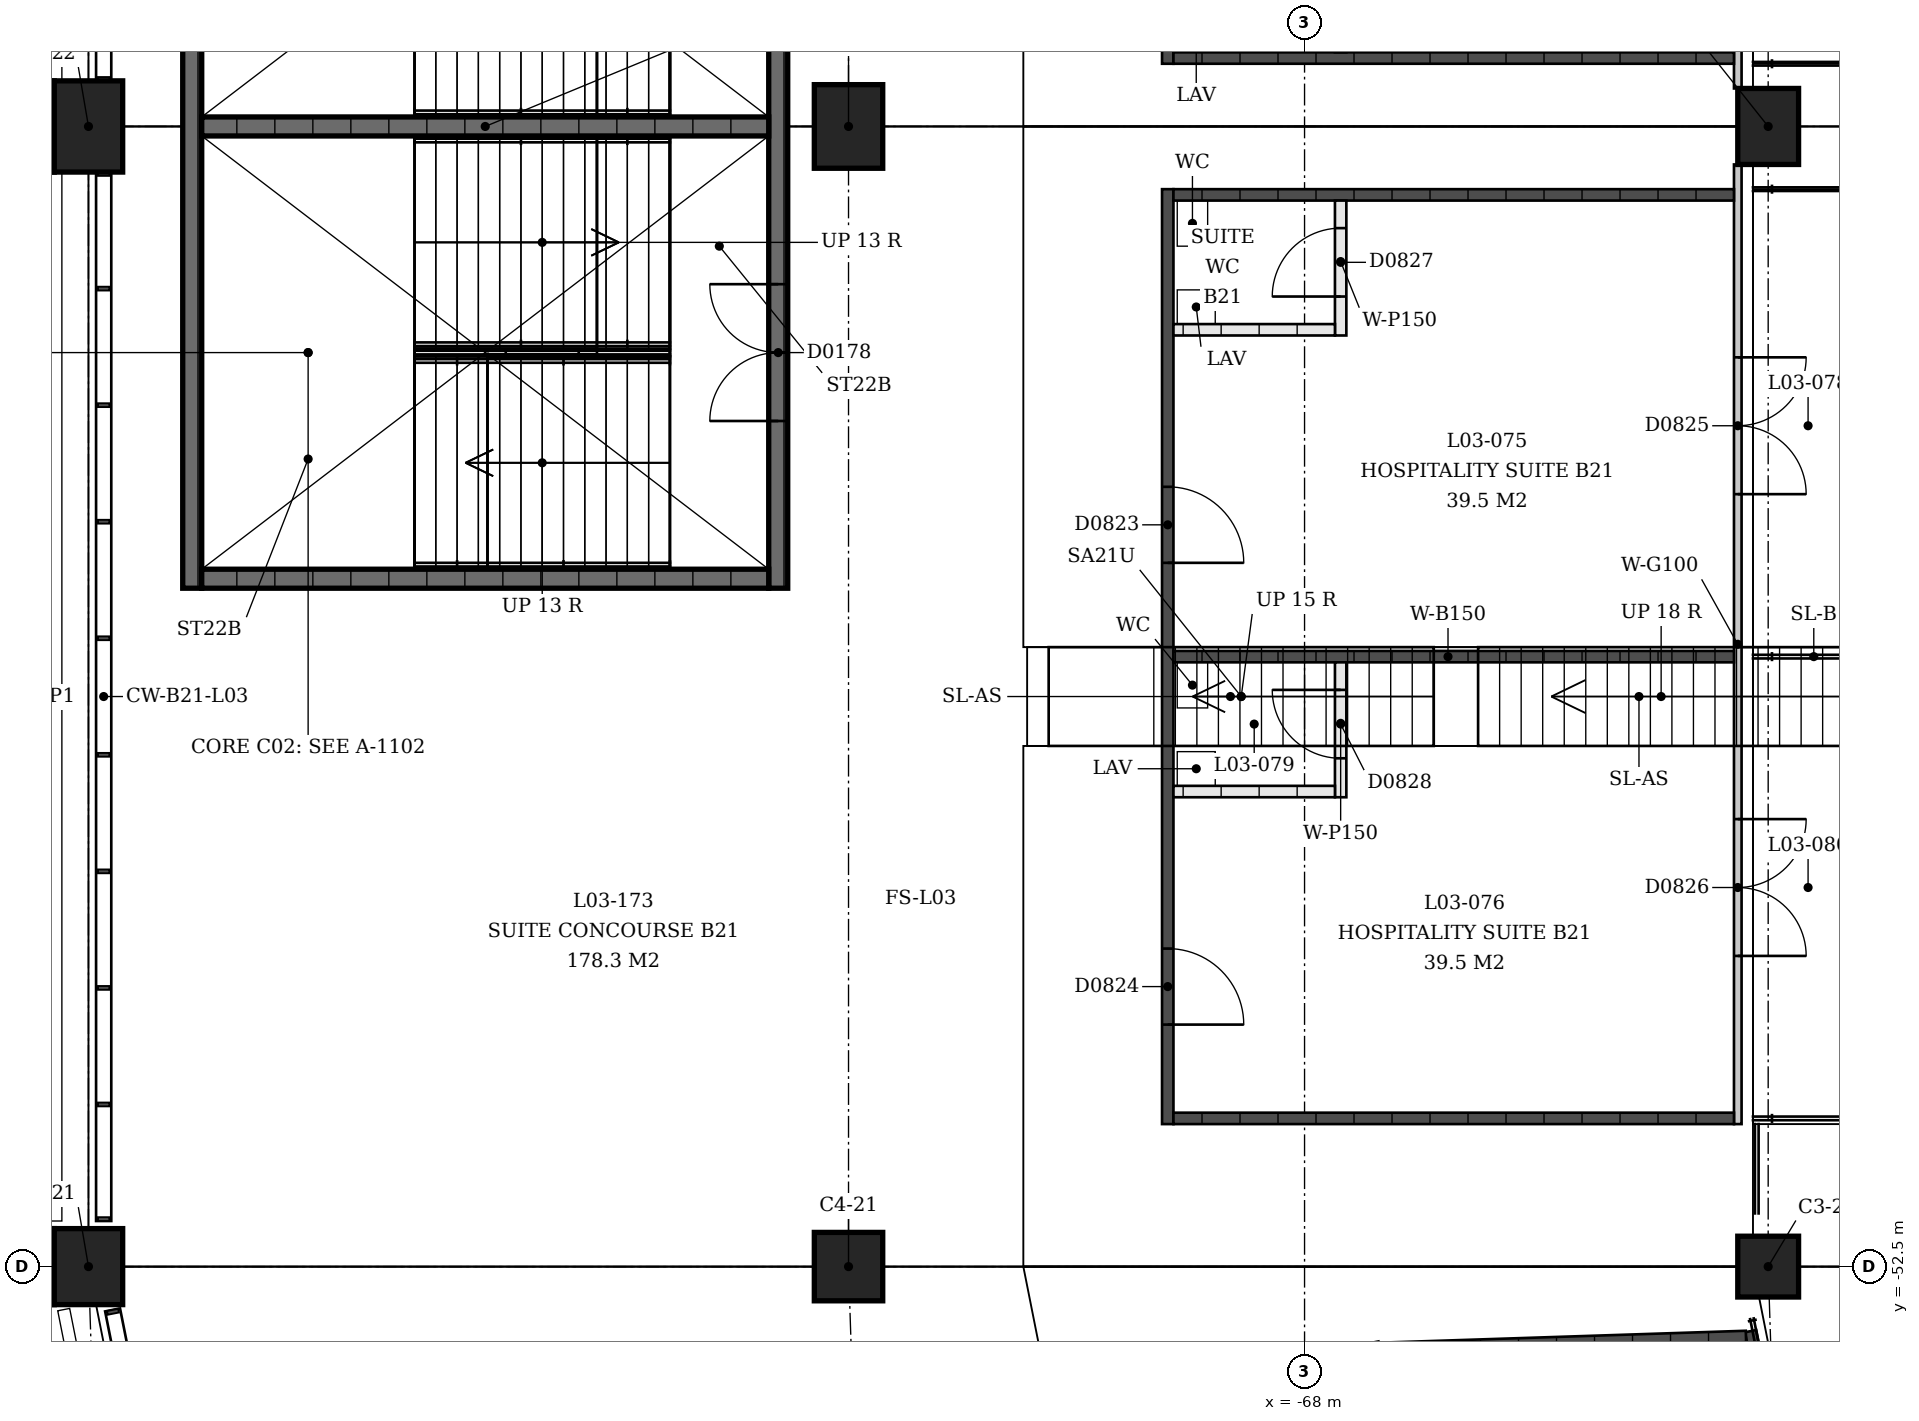
"""IFC4 building model, lengths in metres.
Left out: names, types, materials, properties, quantities, classifications, styles, units other than length and angle.
Written with IfcOpenShell. Run it as: python <this file> out.ifc"""

import sys

from ifc_helpers import new_model, si_unit, direction, frame, frame_2d, origin, origin_2d, place, context, subcontext, project, spatial, rectangle, extrude, element, fill, save


model = new_model("IFC4")
c1 = context("Model", 3, precision=1e-05, world=origin(), true_north=direction((0.0, 1.0)))
c2 = subcontext(c1, "Body", "Model", "MODEL_VIEW")
j1 = project(units=[si_unit("LENGTHUNIT", "METRE"), si_unit("PLANEANGLEUNIT", "RADIAN")], contexts=[c1])
p1 = place(None, origin())
s1 = spatial("IfcSite", under=j1, at=p1, CompositionType="ELEMENT")
p2 = place(p1, origin())
s2 = spatial("IfcBuilding", under=s1, at=p2, CompositionType="ELEMENT")
p3 = place(p2, frame((0.0, 0.0, 13.5)))
s3 = spatial("IfcBuildingStorey", under=s2, at=p3, CompositionType="ELEMENT", Elevation=13.5)
p4 = place(p3, frame((-61.9, -52.5, 0.0), z_axis=(0.0, 0.0, 1.0), x_axis=(0.0, -1.0, 0.0)))
e1 = element("IfcColumn", 1, at=p4, inside=s3, PredefinedType="COLUMN", context=c2, shape_type="SweptSolid", body=[
    extrude(rectangle(XDim=0.8, YDim=0.8, at=origin_2d()), origin(), (0.0, 0.0, 1.0), 2.033),
])
p5 = place(p3, frame((-74.0, -52.5, 0.0), z_axis=(0.0, 0.0, 1.0), x_axis=(0.0, -1.0, 0.0)))
e2 = element("IfcColumn", 2, at=p5, inside=s3, PredefinedType="COLUMN", context=c2, shape_type="SweptSolid", body=[
    extrude(rectangle(XDim=0.9, YDim=0.9, at=origin_2d()), origin(), (0.0, 0.0, 1.0), 4.5),
])
p6 = place(p3, frame((-84.0, -52.5, 0.0), z_axis=(0.0, 0.0, 1.0), x_axis=(0.0, -1.0, 0.0)))
e3 = element("IfcColumn", 3, at=p6, inside=s3, PredefinedType="COLUMN", context=c2, shape_type="SweptSolid", body=[
    extrude(rectangle(XDim=1.0, YDim=0.9, at=origin_2d()), origin(), (0.0, 0.0, 1.0), 4.5),
])
p7 = place(p3, frame((-61.9, -37.5, 0.0), z_axis=(0.0, 0.0, 1.0), x_axis=(0.0, -1.0, 0.0)))
e4 = element("IfcColumn", 4, at=p7, inside=s3, PredefinedType="COLUMN", context=c2, shape_type="SweptSolid", body=[
    extrude(rectangle(XDim=1.0, YDim=0.8, at=origin_2d()), origin(), (0.0, 0.0, 1.0), 2.033),
])
p8 = place(p3, frame((-74.0, -37.5, 0.0), z_axis=(0.0, 0.0, 1.0), x_axis=(0.0, -1.0, 0.0)))
e5 = element("IfcColumn", 5, at=p8, inside=s3, PredefinedType="COLUMN", context=c2, shape_type="SweptSolid", body=[
    extrude(rectangle(XDim=1.1, YDim=0.9, at=origin_2d()), origin(), (0.0, 0.0, 1.0), 4.5),
])
p9 = place(p3, frame((-84.0, -37.5, 0.0), z_axis=(0.0, 0.0, 1.0), x_axis=(0.0, -1.0, 0.0)))
e6 = element("IfcColumn", 6, at=p9, inside=s3, PredefinedType="COLUMN", context=c2, shape_type="SweptSolid", body=[
    extrude(rectangle(XDim=1.2, YDim=0.9, at=origin_2d()), origin(), (0.0, 0.0, 1.0), 4.5),
])
p10 = place(p3, frame((-74.925, -31.425, 0.0), z_axis=(0.0, 0.0, 1.0), x_axis=(0.0, -1.0, 0.0)))
e7 = element("IfcWall", 7, at=p10, inside=s3, PredefinedType="SHEAR", context=c2, shape_type="SweptSolid", body=[
    extrude(rectangle(XDim=12.15, YDim=0.25, at=frame_2d((6.075, 0.0))), origin(), (0.0, 0.0, 1.0), 4.09),
])
p11 = place(p10, frame((2.2, 0.0, 0.0)))
e8 = element("IfcOpeningElement", 8, at=p11, cuts=e7, PredefinedType="OPENING", context=c2, shape_type="SweptSolid", body=[
    extrude(rectangle(XDim=1.8, YDim=2.1, at=frame_2d((0.9, 1.05))), frame((0.0, 0.125, 0.0), z_axis=(0.0, -1.0, 0.0), x_axis=(1.0, 0.0, 0.0)), (0.0, 0.0, 1.0), 0.25),
])
p12 = place(p10, frame((8.15, 0.0, 0.0)))
e9 = element("IfcOpeningElement", 9, at=p12, cuts=e7, PredefinedType="OPENING", context=c2, shape_type="SweptSolid", body=[
    extrude(rectangle(XDim=1.8, YDim=2.1, at=frame_2d((0.9, 1.05))), frame((0.0, 0.125, 0.0), z_axis=(0.0, -1.0, 0.0), x_axis=(1.0, 0.0, 0.0)), (0.0, 0.0, 1.0), 0.25),
])
p13 = place(p3, frame((-82.635, -31.425, 0.0), z_axis=(0.0, 0.0, 1.0), x_axis=(0.0, -1.0, 0.0)))
e10 = element("IfcWall", 10, at=p13, inside=s3, PredefinedType="SHEAR", context=c2, shape_type="SweptSolid", body=[
    extrude(rectangle(XDim=12.15, YDim=0.25, at=frame_2d((6.075, 0.0))), origin(), (0.0, 0.0, 1.0), 4.09),
])
for number, where, z_axis, x_axis in (
    (11, (-75.05, -43.45, 0.0), (0.0, 0.0, 1.0), (-1.0, 0.0, 0.0)),
    (12, (-75.05, -37.5, 0.0), (0.0, 0.0, 1.0), (-1.0, 0.0, 0.0)),
):
    element("IfcWall", number, at=place(p3, frame(where, z_axis=z_axis, x_axis=x_axis)), inside=s3, PredefinedType="SHEAR", context=c2, shape_type="SweptSolid", body=[
        extrude(rectangle(XDim=7.46, YDim=0.25, at=frame_2d((3.73, 0.0))), origin(), (0.0, 0.0, 1.0), 4.09),
    ])
p14 = place(p3, frame((-60.235, -62.88, 0.0), z_axis=(0.0, 0.0, 1.0), x_axis=(-0.19508210738, 0.98078691436, 0.0)))
e13 = element("IfcWall", 13, at=p14, inside=s3, PredefinedType="SOLIDWALL", context=c2, shape_type="SweptSolid", body=[
    extrude(rectangle(XDim=9.718, YDim=0.15, at=frame_2d((4.859, 0.0))), origin(), (0.0, 0.0, 1.0), 3.0),
])
p15 = place(p3, frame((-62.192, -53.419, 0.0), z_axis=(0.0, 0.0, 1.0), x_axis=(-0.999469799468, -0.032559483284, 0.0)))
e14 = element("IfcWall", 14, at=p15, inside=s3, PredefinedType="SOLIDWALL", context=c2, shape_type="SweptSolid", body=[
    extrude(rectangle(XDim=4.821, YDim=0.15, at=frame_2d((2.411, 0.0))), origin(), (0.0, 0.0, 1.0), 3.0),
])
p16 = place(p3, frame((-62.3, -38.0, 0.0), z_axis=(0.0, 0.0, 1.0), x_axis=(0.0, -1.0, 0.0)))
e15 = element("IfcWall", 15, at=p16, inside=s3, PredefinedType="PARTITIONING", context=c2, shape_type="SweptSolid", body=[
    extrude(rectangle(XDim=12.625, YDim=0.1, at=frame_2d((6.312, 0.0))), origin(), (0.0, 0.0, 1.0), 3.0),
])
p17 = place(p16, frame((2.538, 0.0, 0.0)))
e16 = element("IfcOpeningElement", 16, at=p17, cuts=e15, PredefinedType="OPENING", context=c2, shape_type="SweptSolid", body=[
    extrude(rectangle(XDim=1.8, YDim=2.1, at=frame_2d((0.9, 1.05))), frame((0.0, 0.05, 0.0), z_axis=(0.0, -1.0, 0.0), x_axis=(1.0, 0.0, 0.0)), (0.0, 0.0, 1.0), 0.1),
])
p18 = place(p16, frame((8.613, 0.0, 0.0)))
e17 = element("IfcOpeningElement", 17, at=p18, cuts=e15, PredefinedType="OPENING", context=c2, shape_type="SweptSolid", body=[
    extrude(rectangle(XDim=1.8, YDim=2.1, at=frame_2d((0.9, 1.05))), frame((0.0, 0.05, 0.0), z_axis=(0.0, -1.0, 0.0), x_axis=(1.0, 0.0, 0.0)), (0.0, 0.0, 1.0), 0.1),
])
p19 = place(p3, frame((-69.8, -38.325, 0.0), z_axis=(0.0, 0.0, 1.0), x_axis=(0.0, -1.0, 0.0)))
e18 = element("IfcWall", 18, at=p19, inside=s3, PredefinedType="SOLIDWALL", context=c2, shape_type="SweptSolid", body=[
    extrude(rectangle(XDim=12.3, YDim=0.15, at=frame_2d((6.15, 0.0))), origin(), (0.0, 0.0, 1.0), 3.0),
])
p20 = place(p19, frame((3.916, 0.0, 0.0)))
e19 = element("IfcOpeningElement", 19, at=p20, cuts=e18, PredefinedType="OPENING", context=c2, shape_type="SweptSolid", body=[
    extrude(rectangle(XDim=1.0, YDim=2.1, at=frame_2d((0.5, 1.05))), frame((0.0, 0.075, 0.0), z_axis=(0.0, -1.0, 0.0), x_axis=(1.0, 0.0, 0.0)), (0.0, 0.0, 1.0), 0.15),
])
p21 = place(p19, frame((9.991, 0.0, 0.0)))
e20 = element("IfcOpeningElement", 20, at=p21, cuts=e18, PredefinedType="OPENING", context=c2, shape_type="SweptSolid", body=[
    extrude(rectangle(XDim=1.0, YDim=2.1, at=frame_2d((0.5, 1.05))), frame((0.0, 0.075, 0.0), z_axis=(0.0, -1.0, 0.0), x_axis=(1.0, 0.0, 0.0)), (0.0, 0.0, 1.0), 0.15),
])
for number, where, z_axis, x_axis in (
    (21, (-62.35, -38.4, 0.0), (0.0, 0.0, 1.0), (-1.0, 0.0, 0.0)),
    (22, (-62.35, -44.475, 0.0), (0.0, 0.0, 1.0), (-1.0, 0.0, 0.0)),
    (23, (-62.35, -50.55, 0.0), (0.0, 0.0, 1.0), (-1.0, 0.0, 0.0)),
):
    element("IfcWall", number, at=place(p3, frame(where, z_axis=z_axis, x_axis=x_axis)), inside=s3, PredefinedType="SOLIDWALL", context=c2, shape_type="SweptSolid", body=[
        extrude(rectangle(XDim=7.375, YDim=0.15, at=frame_2d((3.688, 0.0))), origin(), (0.0, 0.0, 1.0), 3.0),
    ])
p22 = place(p3, frame((-67.525, -38.475, 0.0), z_axis=(0.0, 0.0, 1.0), x_axis=(0.0, -1.0, 0.0)))
e24 = element("IfcWall", 24, at=p22, inside=s3, PredefinedType="PARTITIONING", context=c2, shape_type="SweptSolid", body=[
    extrude(rectangle(XDim=1.775, YDim=0.15, at=frame_2d((0.887, 0.0))), origin(), (0.0, 0.0, 1.0), 3.0),
])
p23 = place(p22, frame((0.363, 0.0, 0.0)))
e25 = element("IfcOpeningElement", 25, at=p23, cuts=e24, PredefinedType="OPENING", context=c2, shape_type="SweptSolid", body=[
    extrude(rectangle(XDim=0.9, YDim=2.1, at=frame_2d((0.45, 1.05))), frame((0.0, 0.075, 0.0), z_axis=(0.0, -1.0, 0.0), x_axis=(1.0, 0.0, 0.0)), (0.0, 0.0, 1.0), 0.15),
])
p24 = place(p3, frame((-67.6, -40.175, 0.0), z_axis=(0.0, 0.0, 1.0), x_axis=(-1.0, 0.0, 0.0)))
e26 = element("IfcWall", 26, at=p24, inside=s3, PredefinedType="PARTITIONING", context=c2, shape_type="SweptSolid", body=[
    extrude(rectangle(XDim=2.125, YDim=0.15, at=frame_2d((1.062, 0.0))), origin(), (0.0, 0.0, 1.0), 3.0),
])
p25 = place(p3, frame((-67.525, -44.55, 0.0), z_axis=(0.0, 0.0, 1.0), x_axis=(0.0, -1.0, 0.0)))
e27 = element("IfcWall", 27, at=p25, inside=s3, PredefinedType="PARTITIONING", context=c2, shape_type="SweptSolid", body=[
    extrude(rectangle(XDim=1.775, YDim=0.15, at=frame_2d((0.887, 0.0))), origin(), (0.0, 0.0, 1.0), 3.0),
])
p26 = place(p25, frame((0.363, 0.0, 0.0)))
e28 = element("IfcOpeningElement", 28, at=p26, cuts=e27, PredefinedType="OPENING", context=c2, shape_type="SweptSolid", body=[
    extrude(rectangle(XDim=0.9, YDim=2.1, at=frame_2d((0.45, 1.05))), frame((0.0, 0.075, 0.0), z_axis=(0.0, -1.0, 0.0), x_axis=(1.0, 0.0, 0.0)), (0.0, 0.0, 1.0), 0.15),
])
p27 = place(p3, frame((-67.6, -46.25, 0.0), z_axis=(0.0, 0.0, 1.0), x_axis=(-1.0, 0.0, 0.0)))
e29 = element("IfcWall", 29, at=p27, inside=s3, PredefinedType="PARTITIONING", context=c2, shape_type="SweptSolid", body=[
    extrude(rectangle(XDim=2.125, YDim=0.15, at=frame_2d((1.062, 0.0))), origin(), (0.0, 0.0, 1.0), 3.0),
])
p28 = place(p3, frame((-62.3, -37.0, 0.0), z_axis=(0.0, 0.0, 1.0), x_axis=(0.0, 1.0, 0.0)))
e30 = element("IfcWall", 30, at=p28, inside=s3, PredefinedType="PARTITIONING", context=c2, shape_type="SweptSolid", body=[
    extrude(rectangle(XDim=12.625, YDim=0.1, at=frame_2d((6.312, 0.0))), origin(), (0.0, 0.0, 1.0), 3.0),
])
p29 = place(p28, frame((2.538, 0.0, 0.0)))
e31 = element("IfcOpeningElement", 31, at=p29, cuts=e30, PredefinedType="OPENING", context=c2, shape_type="SweptSolid", body=[
    extrude(rectangle(XDim=1.8, YDim=2.1, at=frame_2d((0.9, 1.05))), frame((0.0, 0.05, 0.0), z_axis=(0.0, -1.0, 0.0), x_axis=(1.0, 0.0, 0.0)), (0.0, 0.0, 1.0), 0.1),
])
p30 = place(p28, frame((8.613, 0.0, 0.0)))
e32 = element("IfcOpeningElement", 32, at=p30, cuts=e30, PredefinedType="OPENING", context=c2, shape_type="SweptSolid", body=[
    extrude(rectangle(XDim=1.8, YDim=2.1, at=frame_2d((0.9, 1.05))), frame((0.0, 0.05, 0.0), z_axis=(0.0, -1.0, 0.0), x_axis=(1.0, 0.0, 0.0)), (0.0, 0.0, 1.0), 0.1),
])
p31 = place(p3, frame((-69.8, -36.675, 0.0), z_axis=(0.0, 0.0, 1.0), x_axis=(0.0, 1.0, 0.0)))
e33 = element("IfcWall", 33, at=p31, inside=s3, PredefinedType="SOLIDWALL", context=c2, shape_type="SweptSolid", body=[
    extrude(rectangle(XDim=12.3, YDim=0.15, at=frame_2d((6.15, 0.0))), origin(), (0.0, 0.0, 1.0), 3.0),
])
p32 = place(p31, frame((3.916, 0.0, 0.0)))
e34 = element("IfcOpeningElement", 34, at=p32, cuts=e33, PredefinedType="OPENING", context=c2, shape_type="SweptSolid", body=[
    extrude(rectangle(XDim=1.0, YDim=2.1, at=frame_2d((0.5, 1.05))), frame((0.0, 0.075, 0.0), z_axis=(0.0, -1.0, 0.0), x_axis=(1.0, 0.0, 0.0)), (0.0, 0.0, 1.0), 0.15),
])
p33 = place(p31, frame((9.991, 0.0, 0.0)))
e35 = element("IfcOpeningElement", 35, at=p33, cuts=e33, PredefinedType="OPENING", context=c2, shape_type="SweptSolid", body=[
    extrude(rectangle(XDim=1.0, YDim=2.1, at=frame_2d((0.5, 1.05))), frame((0.0, 0.075, 0.0), z_axis=(0.0, -1.0, 0.0), x_axis=(1.0, 0.0, 0.0)), (0.0, 0.0, 1.0), 0.15),
])
p34 = place(p3, frame((-62.35, -36.6, 0.0), z_axis=(0.0, 0.0, 1.0), x_axis=(-1.0, 0.0, 0.0)))
e36 = element("IfcWall", 36, at=p34, inside=s3, PredefinedType="SOLIDWALL", context=c2, shape_type="SweptSolid", body=[
    extrude(rectangle(XDim=7.375, YDim=0.15, at=frame_2d((3.688, 0.0))), origin(), (0.0, 0.0, 1.0), 3.0),
])
p35 = place(p3, frame((-67.525, -36.525, 0.0), z_axis=(0.0, 0.0, 1.0), x_axis=(0.0, 1.0, 0.0)))
e37 = element("IfcWall", 37, at=p35, inside=s3, PredefinedType="PARTITIONING", context=c2, shape_type="SweptSolid", body=[
    extrude(rectangle(XDim=1.775, YDim=0.15, at=frame_2d((0.887, 0.0))), origin(), (0.0, 0.0, 1.0), 3.0),
])
p36 = place(p35, frame((0.363, 0.0, 0.0)))
e38 = element("IfcOpeningElement", 38, at=p36, cuts=e37, PredefinedType="OPENING", context=c2, shape_type="SweptSolid", body=[
    extrude(rectangle(XDim=0.9, YDim=2.1, at=frame_2d((0.45, 1.05))), frame((0.0, 0.075, 0.0), z_axis=(0.0, -1.0, 0.0), x_axis=(1.0, 0.0, 0.0)), (0.0, 0.0, 1.0), 0.15),
])
p37 = place(p12, origin())
e39 = element("IfcDoor", 39, at=p37, inside=s3, OperationType="DOUBLE_DOOR_SINGLE_SWING", PredefinedType="DOOR", context=c2, shape_type="SweptSolid", body=[
    extrude(rectangle(XDim=1.8, YDim=2.1, at=frame_2d((0.9, 1.05))), frame((0.0, 0.025, 0.0), z_axis=(0.0, -1.0, 0.0), x_axis=(1.0, 0.0, 0.0)), (0.0, 0.0, 1.0), 0.05),
])
fill(e9, e39)
p38 = place(p20, origin())
e40 = element("IfcDoor", 40, at=p38, inside=s3, OperationType="SINGLE_SWING_LEFT", PredefinedType="DOOR", context=c2, shape_type="SweptSolid", body=[
    extrude(rectangle(XDim=1.0, YDim=2.1, at=frame_2d((0.5, 1.05))), frame((0.0, 0.025, 0.0), z_axis=(0.0, -1.0, 0.0), x_axis=(1.0, 0.0, 0.0)), (0.0, 0.0, 1.0), 0.05),
])
fill(e19, e40)
p39 = place(p21, origin())
e41 = element("IfcDoor", 41, at=p39, inside=s3, OperationType="SINGLE_SWING_LEFT", PredefinedType="DOOR", context=c2, shape_type="SweptSolid", body=[
    extrude(rectangle(XDim=1.0, YDim=2.1, at=frame_2d((0.5, 1.05))), frame((0.0, 0.025, 0.0), z_axis=(0.0, -1.0, 0.0), x_axis=(1.0, 0.0, 0.0)), (0.0, 0.0, 1.0), 0.05),
])
fill(e20, e41)
p40 = place(p17, origin())
e42 = element("IfcDoor", 42, at=p40, inside=s3, OperationType="DOUBLE_DOOR_SINGLE_SWING", PredefinedType="DOOR", context=c2, shape_type="SweptSolid", body=[
    extrude(rectangle(XDim=1.8, YDim=2.1, at=frame_2d((0.9, 1.05))), frame((0.0, 0.025, 0.0), z_axis=(0.0, -1.0, 0.0), x_axis=(1.0, 0.0, 0.0)), (0.0, 0.0, 1.0), 0.05),
])
fill(e16, e42)
p41 = place(p18, origin())
e43 = element("IfcDoor", 43, at=p41, inside=s3, OperationType="DOUBLE_DOOR_SINGLE_SWING", PredefinedType="DOOR", context=c2, shape_type="SweptSolid", body=[
    extrude(rectangle(XDim=1.8, YDim=2.1, at=frame_2d((0.9, 1.05))), frame((0.0, 0.025, 0.0), z_axis=(0.0, -1.0, 0.0), x_axis=(1.0, 0.0, 0.0)), (0.0, 0.0, 1.0), 0.05),
])
fill(e17, e43)
p42 = place(p23, origin())
e44 = element("IfcDoor", 44, at=p42, inside=s3, OperationType="SINGLE_SWING_RIGHT", PredefinedType="DOOR", context=c2, shape_type="SweptSolid", body=[
    extrude(rectangle(XDim=0.9, YDim=2.1, at=frame_2d((0.45, 1.05))), frame((0.0, 0.025, 0.0), z_axis=(0.0, -1.0, 0.0), x_axis=(1.0, 0.0, 0.0)), (0.0, 0.0, 1.0), 0.05),
])
fill(e25, e44)
p43 = place(p26, origin())
e45 = element("IfcDoor", 45, at=p43, inside=s3, OperationType="SINGLE_SWING_LEFT", PredefinedType="DOOR", context=c2, shape_type="SweptSolid", body=[
    extrude(rectangle(XDim=0.9, YDim=2.1, at=frame_2d((0.45, 1.05))), frame((0.0, 0.025, 0.0), z_axis=(0.0, -1.0, 0.0), x_axis=(1.0, 0.0, 0.0)), (0.0, 0.0, 1.0), 0.05),
])
fill(e28, e45)
save(model, sys.argv[1])
